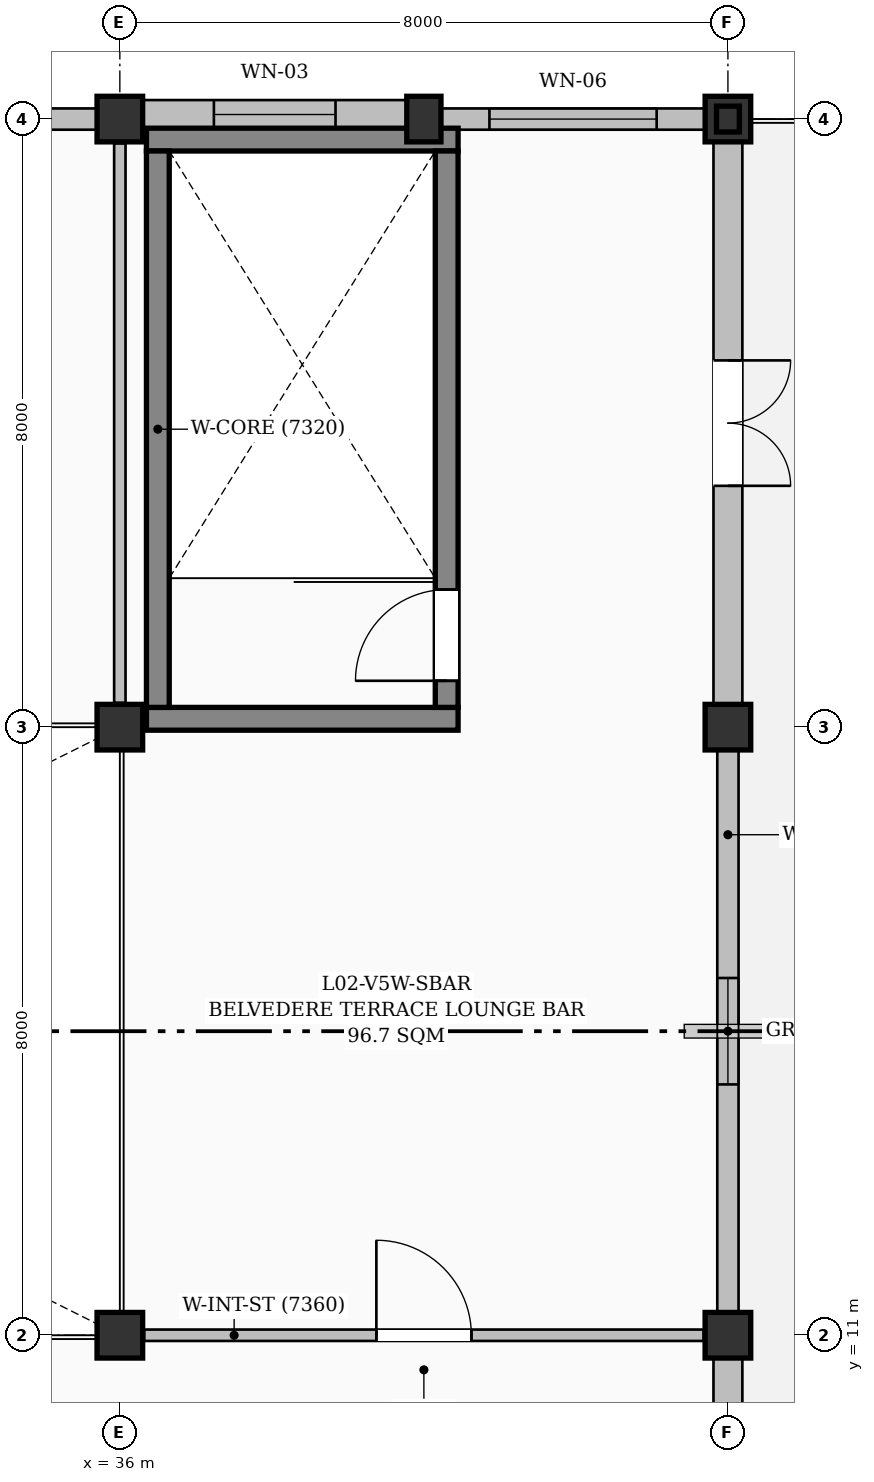
"""IFC4 building model, lengths in metres.
Left out: names, types, materials, properties, quantities, classifications, styles, units other than length and angle.
Written with IfcOpenShell. Run it as: python <this file> out.ifc"""

import sys

from ifc_helpers import new_model, si_unit, direction, frame, frame_2d, origin, origin_2d, place, context, subcontext, project, spatial, rectangle, i_section, extrude, element, fill, save


model = new_model("IFC4")
c1 = context("Model", 3, precision=1e-05, world=origin(), true_north=direction((0.0, 1.0)))
c2 = subcontext(c1, "Body", "Model", "MODEL_VIEW")
j1 = project(units=[si_unit("LENGTHUNIT", "METRE"), si_unit("PLANEANGLEUNIT", "RADIAN")], contexts=[c1])
p1 = place(None, origin())
s1 = spatial("IfcSite", under=j1, at=p1, CompositionType="ELEMENT")
p2 = place(p1, origin())
s2 = spatial("IfcBuilding", under=s1, at=p2, CompositionType="ELEMENT")
p3 = place(p2, frame((0.0, 0.0, 9.3)))
s3 = spatial("IfcBuildingStorey", under=s2, at=p3, CompositionType="ELEMENT", Elevation=9.3)
for number, where, z_axis, x_axis in (
    (1, (36.0, 11.0, 0.0), (0.0, 0.0, 1.0), (1.0, 0.0, 0.0)),
    (2, (36.0, 19.0, 0.0), (0.0, 0.0, 1.0), (1.0, 0.0, 0.0)),
    (3, (36.0, 27.0, 0.0), (0.0, 0.0, 1.0), (1.0, 0.0, 0.0)),
):
    element("IfcColumn", number, at=place(p3, frame(where, z_axis=z_axis, x_axis=x_axis)), inside=s3, PredefinedType="COLUMN", context=c2, shape_type="SweptSolid", body=[
        extrude(rectangle(XDim=0.6, YDim=0.6, at=origin_2d()), origin(), (0.0, 0.0, 1.0), 4.5),
    ])
p4 = place(p3, frame((40.0, 27.0, 0.0), z_axis=(0.0, 0.0, 1.0), x_axis=(1.0, 0.0, 0.0)))
e4 = element("IfcColumn", 4, at=p4, inside=s3, PredefinedType="PILASTER", context=c2, shape_type="SweptSolid", body=[
    extrude(rectangle(XDim=0.45, YDim=0.6, at=origin_2d()), origin(), (0.0, 0.0, 1.0), 4.5),
])
for number, where, z_axis, x_axis in (
    (5, (44.0, 11.0, 0.0), (0.0, 0.0, 1.0), (1.0, 0.0, 0.0)),
    (6, (44.0, 19.0, 0.0), (0.0, 0.0, 1.0), (1.0, 0.0, 0.0)),
    (7, (44.0, 27.0, 0.0), (0.0, 0.0, 1.0), (1.0, 0.0, 0.0)),
):
    element("IfcColumn", number, at=place(p3, frame(where, z_axis=z_axis, x_axis=x_axis)), inside=s3, PredefinedType="COLUMN", context=c2, shape_type="SweptSolid", body=[
        extrude(rectangle(XDim=0.6, YDim=0.6, at=origin_2d()), origin(), (0.0, 0.0, 1.0), 4.5),
    ])
p5 = place(p3, frame((44.0, 27.0, 4.5), z_axis=(0.0, 0.0, 1.0), x_axis=(1.0, 0.0, 0.0)))
e8 = element("IfcColumn", 8, at=p5, inside=s3, PredefinedType="COLUMN", context=c2, shape_type="SweptSolid", body=[
    extrude(i_section(OverallWidth=0.3, OverallDepth=0.34, WebThickness=0.012, FlangeThickness=0.021, FilletRadius=0.027, at=origin_2d()), origin(), (0.0, 0.0, 1.0), 1.566),
])
p6 = place(p3, frame((32.25, 27.0, 0.0), z_axis=(0.0, 0.0, 1.0), x_axis=(1.0, 0.0, 0.0)))
e9 = element("IfcWall", 9, at=p6, inside=s3, PredefinedType="SOLIDWALL", context=c2, shape_type="SweptSolid", body=[
    extrude(rectangle(XDim=3.45, YDim=0.28, at=frame_2d((1.725, 0.0))), origin(), (0.0, 0.0, 1.0), 4.125),
])
p7 = place(p6, frame((0.875, 0.0, 0.95)))
e10 = element("IfcOpeningElement", 10, at=p7, cuts=e9, PredefinedType="OPENING", context=c2, shape_type="SweptSolid", body=[
    extrude(rectangle(XDim=1.7, YDim=2.0, at=frame_2d((0.85, 1.0))), frame((0.0, 0.15, 0.0), z_axis=(0.0, -1.0, 0.0), x_axis=(1.0, 0.0, 0.0)), (0.0, 0.0, 1.0), 0.3),
])
p8 = place(p3, frame((36.3, 27.06, 0.0), z_axis=(0.0, 0.0, 1.0), x_axis=(1.0, 0.0, 0.0)))
e11 = element("IfcWall", 11, at=p8, inside=s3, PredefinedType="SOLIDWALL", context=c2, shape_type="SweptSolid", body=[
    extrude(rectangle(XDim=3.475, YDim=0.38, at=frame_2d((1.737, 0.0))), origin(), (0.0, 0.0, 1.0), 4.125),
])
p9 = place(p8, frame((0.938, 0.0, 0.95)))
e12 = element("IfcOpeningElement", 12, at=p9, cuts=e11, PredefinedType="OPENING", context=c2, shape_type="SweptSolid", body=[
    extrude(rectangle(XDim=1.6, YDim=1.8, at=frame_2d((0.8, 0.9))), frame((0.0, 0.2, 0.0), z_axis=(0.0, -1.0, 0.0), x_axis=(1.0, 0.0, 0.0)), (0.0, 0.0, 1.0), 0.4),
])
p10 = place(p3, frame((40.225, 27.0, 0.0), z_axis=(0.0, 0.0, 1.0), x_axis=(1.0, 0.0, 0.0)))
e13 = element("IfcWall", 13, at=p10, inside=s3, PredefinedType="SOLIDWALL", context=c2, shape_type="SweptSolid", body=[
    extrude(rectangle(XDim=3.475, YDim=0.28, at=frame_2d((1.737, 0.0))), origin(), (0.0, 0.0, 1.0), 4.125),
])
p11 = place(p10, frame((0.637, 0.0, 0.95)))
e14 = element("IfcOpeningElement", 14, at=p11, cuts=e13, PredefinedType="OPENING", context=c2, shape_type="SweptSolid", body=[
    extrude(rectangle(XDim=2.2, YDim=1.8, at=frame_2d((1.1, 0.9))), frame((0.0, 0.15, 0.0), z_axis=(0.0, -1.0, 0.0), x_axis=(1.0, 0.0, 0.0)), (0.0, 0.0, 1.0), 0.3),
])
p12 = place(p3, frame((44.0, 26.7, 0.0), z_axis=(0.0, 0.0, 1.0), x_axis=(0.0, -1.0, 0.0)))
e15 = element("IfcWall", 15, at=p12, inside=s3, PredefinedType="SOLIDWALL", context=c2, shape_type="SweptSolid", body=[
    extrude(rectangle(XDim=7.4, YDim=0.38, at=frame_2d((3.7, 0.0))), origin(), (0.0, 0.0, 1.0), 3.585),
])
p13 = place(p12, frame((2.875, 0.0, 0.0)))
e16 = element("IfcOpeningElement", 16, at=p13, cuts=e15, PredefinedType="OPENING", context=c2, shape_type="SweptSolid", body=[
    extrude(rectangle(XDim=1.65, YDim=2.25, at=frame_2d((0.825, 1.125))), frame((0.0, 0.2, 0.0), z_axis=(0.0, -1.0, 0.0), x_axis=(1.0, 0.0, 0.0)), (0.0, 0.0, 1.0), 0.4),
])
p14 = place(p3, frame((44.0, 18.7, 0.0), z_axis=(0.0, 0.0, 1.0), x_axis=(0.0, -1.0, 0.0)))
e17 = element("IfcWall", 17, at=p14, inside=s3, PredefinedType="SOLIDWALL", context=c2, shape_type="SweptSolid", body=[
    extrude(rectangle(XDim=7.4, YDim=0.28, at=frame_2d((3.7, 0.0))), origin(), (0.0, 0.0, 1.0), 3.585),
])
p15 = place(p14, frame((3.0, 0.0, 0.95)))
e18 = element("IfcOpeningElement", 18, at=p15, cuts=e17, PredefinedType="OPENING", context=c2, shape_type="SweptSolid", body=[
    extrude(rectangle(XDim=1.4, YDim=1.8, at=frame_2d((0.7, 0.9))), frame((0.0, 0.15, 0.0), z_axis=(0.0, -1.0, 0.0), x_axis=(1.0, 0.0, 0.0)), (0.0, 0.0, 1.0), 0.3),
])
p16 = place(p3, frame((44.0, 10.7, 0.0), z_axis=(0.0, 0.0, 1.0), x_axis=(0.0, -1.0, 0.0)))
e19 = element("IfcWall", 19, at=p16, inside=s3, PredefinedType="SOLIDWALL", context=c2, shape_type="SweptSolid", body=[
    extrude(rectangle(XDim=7.4, YDim=0.38, at=frame_2d((3.7, 0.0))), origin(), (0.0, 0.0, 1.0), 3.585),
])
p17 = place(p16, frame((2.7, 0.0, 0.95)))
e20 = element("IfcOpeningElement", 20, at=p17, cuts=e19, PredefinedType="OPENING", context=c2, shape_type="SweptSolid", body=[
    extrude(rectangle(XDim=2.0, YDim=1.8, at=frame_2d((1.0, 0.9))), frame((0.0, 0.2, 0.0), z_axis=(0.0, -1.0, 0.0), x_axis=(1.0, 0.0, 0.0)), (0.0, 0.0, 1.0), 0.4),
])
for number, where, z_axis, x_axis in (
    (21, (36.35, 19.11, 0.0), (0.0, 0.0, 1.0), (1.0, 0.0, 0.0)),
    (22, (40.45, 26.73, 0.0), (0.0, 0.0, 1.0), (-1.0, 0.0, 0.0)),
):
    element("IfcWall", number, at=place(p3, frame(where, z_axis=z_axis, x_axis=x_axis)), inside=s3, PredefinedType="SHEAR", context=c2, shape_type="SweptSolid", body=[
        extrude(rectangle(XDim=4.1, YDim=0.3, at=frame_2d((2.05, 0.0))), origin(), (0.0, 0.0, 1.0), 4.25),
    ])
p18 = place(p3, frame((36.5, 19.26, 0.0), z_axis=(0.0, 0.0, 1.0), x_axis=(0.0, 1.0, 0.0)))
e23 = element("IfcWall", 23, at=p18, inside=s3, PredefinedType="SHEAR", context=c2, shape_type="SweptSolid", body=[
    extrude(rectangle(XDim=7.32, YDim=0.3, at=frame_2d((3.66, 0.0))), origin(), (0.0, 0.0, 1.0), 4.25),
])
p19 = place(p3, frame((40.3, 19.26, 0.0), z_axis=(0.0, 0.0, 1.0), x_axis=(0.0, 1.0, 0.0)))
e24 = element("IfcWall", 24, at=p19, inside=s3, PredefinedType="SHEAR", context=c2, shape_type="SweptSolid", body=[
    extrude(rectangle(XDim=7.32, YDim=0.3, at=frame_2d((3.66, 0.0))), origin(), (0.0, 0.0, 1.0), 4.25),
])
p20 = place(p19, frame((0.35, 0.0, 0.0)))
e25 = element("IfcOpeningElement", 25, at=p20, cuts=e24, PredefinedType="OPENING", context=c2, shape_type="SweptSolid", body=[
    extrude(rectangle(XDim=1.2, YDim=2.15, at=frame_2d((0.6, 1.075))), frame((0.0, 0.16, 0.0), z_axis=(0.0, -1.0, 0.0), x_axis=(1.0, 0.0, 0.0)), (0.0, 0.0, 1.0), 0.32),
])
p21 = place(p3, frame((36.32, 11.0, 0.0), z_axis=(0.0, 0.0, 1.0), x_axis=(1.0, 0.0, 0.0)))
e26 = element("IfcWall", 26, at=p21, inside=s3, PredefinedType="PARTITIONING", context=c2, shape_type="SweptSolid", body=[
    extrude(rectangle(XDim=7.36, YDim=0.15, at=frame_2d((3.68, 0.0))), origin(), (0.0, 0.0, 1.0), 4.25),
])
p22 = place(p21, frame((3.055, 0.0, 0.0)))
e27 = element("IfcOpeningElement", 27, at=p22, cuts=e26, PredefinedType="OPENING", context=c2, shape_type="SweptSolid", body=[
    extrude(rectangle(XDim=1.25, YDim=2.15, at=frame_2d((0.625, 1.075))), frame((0.0, 0.085, 0.0), z_axis=(0.0, -1.0, 0.0), x_axis=(1.0, 0.0, 0.0)), (0.0, 0.0, 1.0), 0.17),
])
p23 = place(p3, frame((36.0, 19.32, 0.0), z_axis=(0.0, 0.0, 1.0), x_axis=(0.0, 1.0, 0.0)))
e28 = element("IfcWall", 28, at=p23, inside=s3, PredefinedType="PARTITIONING", context=c2, shape_type="SweptSolid", body=[
    extrude(rectangle(XDim=7.36, YDim=0.15, at=frame_2d((3.68, 0.0))), origin(), (0.0, 0.0, 1.0), 4.25),
])
p24 = place(p9, origin())
e29 = element("IfcWindow", 29, at=p24, inside=s3, PartitioningType="DOUBLE_PANEL_VERTICAL", PredefinedType="WINDOW", context=c2, shape_type="SweptSolid", body=[
    extrude(rectangle(XDim=1.6, YDim=1.8, at=frame_2d((0.8, 0.9))), frame((0.0, 0.03, 0.0), z_axis=(0.0, -1.0, 0.0), x_axis=(1.0, 0.0, 0.0)), (0.0, 0.0, 1.0), 0.06),
])
fill(e12, e29)
p25 = place(p11, origin())
e30 = element("IfcWindow", 30, at=p25, inside=s3, PartitioningType="TRIPLE_PANEL_VERTICAL", PredefinedType="WINDOW", context=c2, shape_type="SweptSolid", body=[
    extrude(rectangle(XDim=2.2, YDim=1.8, at=frame_2d((1.1, 0.9))), frame((0.0, 0.03, 0.0), z_axis=(0.0, -1.0, 0.0), x_axis=(1.0, 0.0, 0.0)), (0.0, 0.0, 1.0), 0.06),
])
fill(e14, e30)
p26 = place(p13, origin())
e31 = element("IfcDoor", 31, at=p26, inside=s3, OperationType="DOUBLE_DOOR_SINGLE_SWING", PredefinedType="DOOR", context=c2, shape_type="SweptSolid", body=[
    extrude(rectangle(XDim=1.65, YDim=2.25, at=frame_2d((0.825, 1.125))), frame((0.0, 0.025, 0.0), z_axis=(0.0, -1.0, 0.0), x_axis=(1.0, 0.0, 0.0)), (0.0, 0.0, 1.0), 0.05),
])
fill(e16, e31)
p27 = place(p15, origin())
e32 = element("IfcWindow", 32, at=p27, inside=s3, PartitioningType="DOUBLE_PANEL_VERTICAL", PredefinedType="WINDOW", context=c2, shape_type="SweptSolid", body=[
    extrude(rectangle(XDim=1.4, YDim=1.8, at=frame_2d((0.7, 0.9))), frame((0.0, 0.03, 0.0), z_axis=(0.0, -1.0, 0.0), x_axis=(1.0, 0.0, 0.0)), (0.0, 0.0, 1.0), 0.06),
])
fill(e18, e32)
p28 = place(p20, origin())
e33 = element("IfcDoor", 33, at=p28, inside=s3, OperationType="SINGLE_SWING_LEFT", PredefinedType="DOOR", context=c2, shape_type="SweptSolid", body=[
    extrude(rectangle(XDim=1.2, YDim=2.15, at=frame_2d((0.6, 1.075))), frame((0.0, 0.025, 0.0), z_axis=(0.0, -1.0, 0.0), x_axis=(1.0, 0.0, 0.0)), (0.0, 0.0, 1.0), 0.05),
])
fill(e25, e33)
p29 = place(p22, origin())
e34 = element("IfcDoor", 34, at=p29, inside=s3, OperationType="SINGLE_SWING_LEFT", PredefinedType="DOOR", context=c2, shape_type="SweptSolid", body=[
    extrude(rectangle(XDim=1.25, YDim=2.15, at=frame_2d((0.625, 1.075))), frame((0.0, 0.025, 0.0), z_axis=(0.0, -1.0, 0.0), x_axis=(1.0, 0.0, 0.0)), (0.0, 0.0, 1.0), 0.05),
])
fill(e27, e34)
save(model, sys.argv[1])
